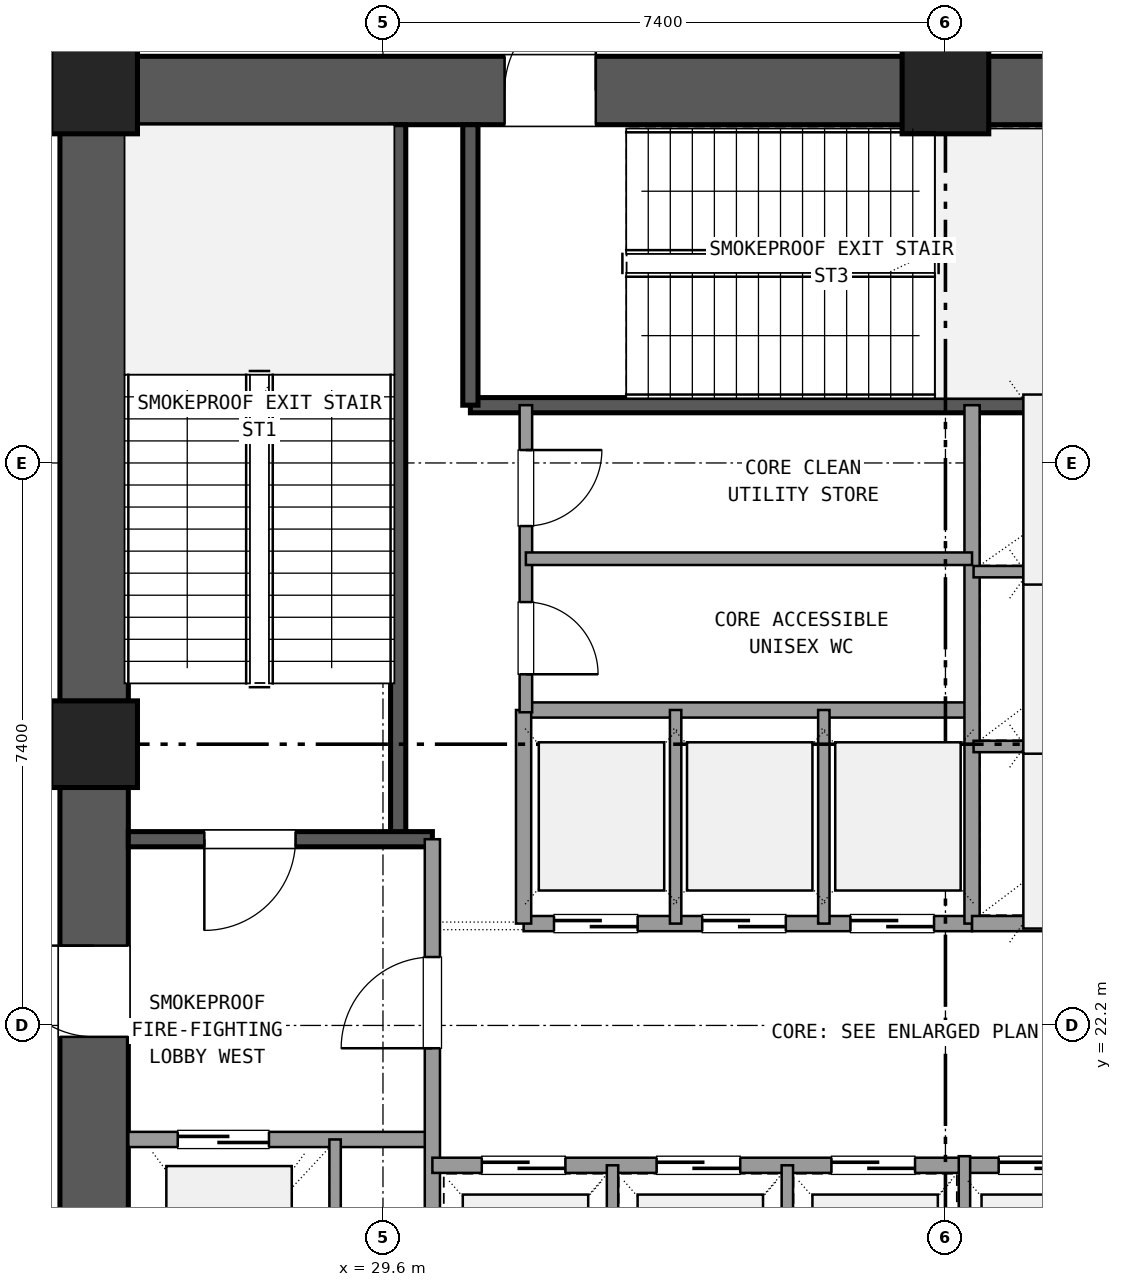
"""IFC4 building model, lengths in metres.
Left out: names, types, materials, properties, quantities, classifications, styles, units other than length and angle.
Written with IfcOpenShell. Run it as: python <this file> out.ifc"""

import sys

from ifc_helpers import new_model, si_unit, direction, frame, frame_2d, origin, origin_2d, place, context, subcontext, project, spatial, rectangle, extrude, element, fill, save


model = new_model("IFC4")
c1 = context("Model", 3, precision=1e-05, world=origin(), true_north=direction((0.0, 1.0)))
c2 = subcontext(c1, "Body", "Model", "MODEL_VIEW")
j1 = project(units=[si_unit("LENGTHUNIT", "METRE"), si_unit("PLANEANGLEUNIT", "RADIAN")], contexts=[c1])
p1 = place(None, origin())
s1 = spatial("IfcSite", under=j1, at=p1, CompositionType="ELEMENT")
p2 = place(p1, origin())
s2 = spatial("IfcBuilding", under=s1, at=p2, CompositionType="ELEMENT")
p3 = place(p2, origin())
s3 = spatial("IfcBuildingStorey", under=s2, at=p3, CompositionType="ELEMENT", Elevation=0.0)
for number, where, z_axis, x_axis in (
    (1, (37.0, 34.5, 0.0), (0.0, 0.0, 1.0), (1.0, 0.0, 0.0)),
    (2, (25.8, 34.5, 0.0), (0.0, 0.0, 1.0), (1.0, 0.0, 0.0)),
    (3, (25.8, 25.9, 0.0), (0.0, 0.0, 1.0), (1.0, 0.0, 0.0)),
):
    element("IfcColumn", number, at=place(p3, frame(where, z_axis=z_axis, x_axis=x_axis)), inside=s3, PredefinedType="COLUMN", context=c2, shape_type="SweptSolid", body=[
        extrude(rectangle(XDim=1.14, YDim=1.14, at=origin_2d()), origin(), (0.0, 0.0, 1.0), 5.4),
    ])
p4 = place(p3, frame((47.635, 34.5, 0.0), z_axis=(0.0, 0.0, 1.0), x_axis=(-1.0, 0.0, 0.0)))
e4 = element("IfcWall", 4, at=p4, inside=s3, PredefinedType="SHEAR", context=c2, shape_type="SweptSolid", body=[
    extrude(rectangle(XDim=10.07, YDim=0.9, at=frame_2d((5.035, 0.0))), origin(), (0.0, 0.0, 1.0), 5.1),
])
p5 = place(p4, frame((4.535, 0.0, 0.0)))
e5 = element("IfcOpeningElement", 5, at=p5, cuts=e4, PredefinedType="OPENING", context=c2, shape_type="SweptSolid", body=[
    extrude(rectangle(XDim=1.6, YDim=2.2, at=frame_2d((0.8, 1.1))), frame((0.0, 0.46, 0.0), z_axis=(0.0, -1.0, 0.0), x_axis=(1.0, 0.0, 0.0)), (0.0, 0.0, 1.0), 0.92),
])
p6 = place(p3, frame((36.435, 34.5, 0.0), z_axis=(0.0, 0.0, 1.0), x_axis=(-1.0, 0.0, 0.0)))
e6 = element("IfcWall", 6, at=p6, inside=s3, PredefinedType="SHEAR", context=c2, shape_type="SweptSolid", body=[
    extrude(rectangle(XDim=10.07, YDim=0.9, at=frame_2d((5.035, 0.0))), origin(), (0.0, 0.0, 1.0), 5.1),
])
p7 = place(p6, frame((4.035, 0.0, 0.0)))
e7 = element("IfcOpeningElement", 7, at=p7, cuts=e6, PredefinedType="OPENING", context=c2, shape_type="SweptSolid", body=[
    extrude(rectangle(XDim=1.2, YDim=2.15, at=frame_2d((0.6, 1.075))), frame((0.0, 0.46, 0.0), z_axis=(0.0, -1.0, 0.0), x_axis=(1.0, 0.0, 0.0)), (0.0, 0.0, 1.0), 0.92),
])
p8 = place(p3, frame((25.8, 33.935, 0.0), z_axis=(0.0, 0.0, 1.0), x_axis=(0.0, -1.0, 0.0)))
e8 = element("IfcWall", 8, at=p8, inside=s3, PredefinedType="SHEAR", context=c2, shape_type="SweptSolid", body=[
    extrude(rectangle(XDim=7.47, YDim=0.9, at=frame_2d((3.735, 0.0))), origin(), (0.0, 0.0, 1.0), 5.1),
])
p9 = place(p3, frame((25.8, 25.335, 0.0), z_axis=(0.0, 0.0, 1.0), x_axis=(0.0, -1.0, 0.0)))
e9 = element("IfcWall", 9, at=p9, inside=s3, PredefinedType="SHEAR", context=c2, shape_type="SweptSolid", body=[
    extrude(rectangle(XDim=7.47, YDim=0.9, at=frame_2d((3.735, 0.0))), origin(), (0.0, 0.0, 1.0), 5.1),
])
p10 = place(p9, frame((2.085, 0.0, 0.0)))
e10 = element("IfcOpeningElement", 10, at=p10, cuts=e9, PredefinedType="OPENING", context=c2, shape_type="SweptSolid", body=[
    extrude(rectangle(XDim=1.2, YDim=2.15, at=frame_2d((0.6, 1.075))), frame((0.0, 0.46, 0.0), z_axis=(0.0, -1.0, 0.0), x_axis=(1.0, 0.0, 0.0)), (0.0, 0.0, 1.0), 0.92),
])
p11 = place(p3, frame((29.8, 24.65, 0.0), z_axis=(0.0, 0.0, 1.0), x_axis=(0.0, 1.0, 0.0)))
e11 = element("IfcWall", 11, at=p11, inside=s3, PredefinedType="SHEAR", context=c2, shape_type="SweptSolid", body=[
    extrude(rectangle(XDim=9.4, YDim=0.2, at=frame_2d((4.7, 0.0))), origin(), (0.0, 0.0, 1.0), 5.1),
])
p12 = place(p3, frame((26.25, 24.65, 0.0), z_axis=(0.0, 0.0, 1.0), x_axis=(1.0, 0.0, 0.0)))
e12 = element("IfcWall", 12, at=p12, inside=s3, PredefinedType="SHEAR", context=c2, shape_type="SweptSolid", body=[
    extrude(rectangle(XDim=4.0, YDim=0.2, at=frame_2d((2.0, 0.0))), origin(), (0.0, 0.0, 1.0), 5.1),
])
p13 = place(p12, frame((1.0, 0.0, 0.0)))
e13 = element("IfcOpeningElement", 13, at=p13, cuts=e12, PredefinedType="OPENING", context=c2, shape_type="SweptSolid", body=[
    extrude(rectangle(XDim=1.2, YDim=2.15, at=frame_2d((0.6, 1.075))), frame((0.0, 0.11, 0.0), z_axis=(0.0, -1.0, 0.0), x_axis=(1.0, 0.0, 0.0)), (0.0, 0.0, 1.0), 0.22),
])
p14 = place(p3, frame((30.75, 30.36, 0.0), z_axis=(0.0, 0.0, 1.0), x_axis=(1.0, 0.0, 0.0)))
e14 = element("IfcWall", 14, at=p14, inside=s3, PredefinedType="SHEAR", context=c2, shape_type="SweptSolid", body=[
    extrude(rectangle(XDim=9.5, YDim=0.2, at=frame_2d((4.75, 0.0))), origin(), (0.0, 0.0, 1.0), 5.1),
])
p15 = place(p3, frame((30.75, 30.36, 0.0), z_axis=(0.0, 0.0, 1.0), x_axis=(0.0, 1.0, 0.0)))
e15 = element("IfcWall", 15, at=p15, inside=s3, PredefinedType="SHEAR", context=c2, shape_type="SweptSolid", body=[
    extrude(rectangle(XDim=3.69, YDim=0.2, at=frame_2d((1.845, 0.0))), origin(), (0.0, 0.0, 1.0), 5.1),
])
p16 = place(p3, frame((26.25, 20.7, 0.0), z_axis=(0.0, 0.0, 1.0), x_axis=(1.0, 0.0, 0.0)))
e16 = element("IfcWall", 16, at=p16, inside=s3, PredefinedType="SOLIDWALL", context=c2, shape_type="SweptSolid", body=[
    extrude(rectangle(XDim=4.0, YDim=0.2, at=frame_2d((2.0, 0.0))), origin(), (0.0, 0.0, 1.0), 4.11),
])
p17 = place(p16, frame((0.65, 0.0, 0.0)))
e17 = element("IfcOpeningElement", 17, at=p17, cuts=e16, PredefinedType="OPENING", context=c2, shape_type="SweptSolid", body=[
    extrude(rectangle(XDim=1.2, YDim=2.15, at=frame_2d((0.6, 1.075))), frame((0.0, 0.11, 0.0), z_axis=(0.0, -1.0, 0.0), x_axis=(1.0, 0.0, 0.0)), (0.0, 0.0, 1.0), 0.22),
])
p18 = place(p3, frame((30.25, 17.75, 0.0), z_axis=(0.0, 0.0, 1.0), x_axis=(0.0, 1.0, 0.0)))
e18 = element("IfcWall", 18, at=p18, inside=s3, PredefinedType="SOLIDWALL", context=c2, shape_type="SweptSolid", body=[
    extrude(rectangle(XDim=6.9, YDim=0.2, at=frame_2d((3.45, 0.0))), origin(), (0.0, 0.0, 1.0), 4.11),
])
p19 = place(p18, frame((4.15, 0.0, 0.0)))
e19 = element("IfcOpeningElement", 19, at=p19, cuts=e18, PredefinedType="OPENING", context=c2, shape_type="SweptSolid", body=[
    extrude(rectangle(XDim=1.2, YDim=2.15, at=frame_2d((0.6, 1.075))), frame((0.0, 0.11, 0.0), z_axis=(0.0, -1.0, 0.0), x_axis=(1.0, 0.0, 0.0)), (0.0, 0.0, 1.0), 0.22),
])
p20 = place(p3, frame((28.97, 17.75, 0.0), z_axis=(0.0, 0.0, 1.0), x_axis=(0.0, 1.0, 0.0)))
e20 = element("IfcWall", 20, at=p20, inside=s3, PredefinedType="PARTITIONING", context=c2, shape_type="SweptSolid", body=[
    extrude(rectangle(XDim=2.95, YDim=0.15, at=frame_2d((1.475, 0.0))), origin(), (0.0, 0.0, 1.0), 4.11),
])
p21 = place(p3, frame((30.25, 20.36, 0.0), z_axis=(0.0, 0.0, 1.0), x_axis=(1.0, 0.0, 0.0)))
e21 = element("IfcWall", 21, at=p21, inside=s3, PredefinedType="SOLIDWALL", context=c2, shape_type="SweptSolid", body=[
    extrude(rectangle(XDim=7.0, YDim=0.2, at=frame_2d((3.5, 0.0))), origin(), (0.0, 0.0, 1.0), 4.11),
])
p22 = place(p21, frame((0.65, 0.0, 0.0)))
e22 = element("IfcOpeningElement", 22, at=p22, cuts=e21, PredefinedType="OPENING", context=c2, shape_type="SweptSolid", body=[
    extrude(rectangle(XDim=1.1, YDim=2.15, at=frame_2d((0.55, 1.075))), frame((0.0, 0.11, 0.0), z_axis=(0.0, -1.0, 0.0), x_axis=(1.0, 0.0, 0.0)), (0.0, 0.0, 1.0), 0.22),
])
p23 = place(p21, frame((2.95, 0.0, 0.0)))
e23 = element("IfcOpeningElement", 23, at=p23, cuts=e21, PredefinedType="OPENING", context=c2, shape_type="SweptSolid", body=[
    extrude(rectangle(XDim=1.1, YDim=2.15, at=frame_2d((0.55, 1.075))), frame((0.0, 0.11, 0.0), z_axis=(0.0, -1.0, 0.0), x_axis=(1.0, 0.0, 0.0)), (0.0, 0.0, 1.0), 0.22),
])
p24 = place(p21, frame((5.25, 0.0, 0.0)))
e24 = element("IfcOpeningElement", 24, at=p24, cuts=e21, PredefinedType="OPENING", context=c2, shape_type="SweptSolid", body=[
    extrude(rectangle(XDim=1.1, YDim=2.15, at=frame_2d((0.55, 1.075))), frame((0.0, 0.11, 0.0), z_axis=(0.0, -1.0, 0.0), x_axis=(1.0, 0.0, 0.0)), (0.0, 0.0, 1.0), 0.22),
])
for number, where, z_axis, x_axis in (
    (25, (32.62, 17.75, 0.0), (0.0, 0.0, 1.0), (0.0, 1.0, 0.0)),
    (26, (34.92, 17.75, 0.0), (0.0, 0.0, 1.0), (0.0, 1.0, 0.0)),
):
    element("IfcWall", number, at=place(p3, frame(where, z_axis=z_axis, x_axis=x_axis)), inside=s3, PredefinedType="PARTITIONING", context=c2, shape_type="SweptSolid", body=[
        extrude(rectangle(XDim=2.61, YDim=0.15, at=frame_2d((1.305, 0.0))), origin(), (0.0, 0.0, 1.0), 4.11),
    ])
p25 = place(p3, frame((37.25, 20.36, 0.0), z_axis=(0.0, 0.0, 1.0), x_axis=(1.0, 0.0, 0.0)))
e27 = element("IfcWall", 27, at=p25, inside=s3, PredefinedType="SOLIDWALL", context=c2, shape_type="SweptSolid", body=[
    extrude(rectangle(XDim=6.1, YDim=0.2, at=frame_2d((3.05, 0.0))), origin(), (0.0, 0.0, 1.0), 4.11),
])
p26 = place(p25, frame((0.45, 0.0, 0.0)))
e28 = element("IfcOpeningElement", 28, at=p26, cuts=e27, PredefinedType="OPENING", context=c2, shape_type="SweptSolid", body=[
    extrude(rectangle(XDim=1.1, YDim=2.15, at=frame_2d((0.55, 1.075))), frame((0.0, 0.11, 0.0), z_axis=(0.0, -1.0, 0.0), x_axis=(1.0, 0.0, 0.0)), (0.0, 0.0, 1.0), 0.22),
])
p27 = place(p25, frame((2.5, 0.0, 0.0)))
e29 = element("IfcOpeningElement", 29, at=p27, cuts=e27, PredefinedType="OPENING", context=c2, shape_type="SweptSolid", body=[
    extrude(rectangle(XDim=1.1, YDim=2.15, at=frame_2d((0.55, 1.075))), frame((0.0, 0.11, 0.0), z_axis=(0.0, -1.0, 0.0), x_axis=(1.0, 0.0, 0.0)), (0.0, 0.0, 1.0), 0.22),
])
p28 = place(p25, frame((4.55, 0.0, 0.0)))
e30 = element("IfcOpeningElement", 30, at=p28, cuts=e27, PredefinedType="OPENING", context=c2, shape_type="SweptSolid", body=[
    extrude(rectangle(XDim=1.1, YDim=2.15, at=frame_2d((0.55, 1.075))), frame((0.0, 0.11, 0.0), z_axis=(0.0, -1.0, 0.0), x_axis=(1.0, 0.0, 0.0)), (0.0, 0.0, 1.0), 0.22),
])
p29 = place(p3, frame((37.25, 17.75, 0.0), z_axis=(0.0, 0.0, 1.0), x_axis=(0.0, 1.0, 0.0)))
e31 = element("IfcWall", 31, at=p29, inside=s3, PredefinedType="PARTITIONING", context=c2, shape_type="SweptSolid", body=[
    extrude(rectangle(XDim=2.73, YDim=0.15, at=frame_2d((1.365, 0.0))), origin(), (0.0, 0.0, 1.0), 4.11),
])
p30 = place(p3, frame((31.45, 23.54, 0.0), z_axis=(0.0, 0.0, 1.0), x_axis=(1.0, 0.0, 0.0)))
e32 = element("IfcWall", 32, at=p30, inside=s3, PredefinedType="SOLIDWALL", context=c2, shape_type="SweptSolid", body=[
    extrude(rectangle(XDim=5.9, YDim=0.2, at=frame_2d((2.95, 0.0))), origin(), (0.0, 0.0, 1.0), 4.11),
])
p31 = place(p30, frame((0.4, 0.0, 0.0)))
e33 = element("IfcOpeningElement", 33, at=p31, cuts=e32, PredefinedType="OPENING", context=c2, shape_type="SweptSolid", body=[
    extrude(rectangle(XDim=1.1, YDim=2.15, at=frame_2d((0.55, 1.075))), frame((0.0, 0.11, 0.0), z_axis=(0.0, -1.0, 0.0), x_axis=(1.0, 0.0, 0.0)), (0.0, 0.0, 1.0), 0.22),
])
p32 = place(p30, frame((2.35, 0.0, 0.0)))
e34 = element("IfcOpeningElement", 34, at=p32, cuts=e32, PredefinedType="OPENING", context=c2, shape_type="SweptSolid", body=[
    extrude(rectangle(XDim=1.1, YDim=2.15, at=frame_2d((0.55, 1.075))), frame((0.0, 0.11, 0.0), z_axis=(0.0, -1.0, 0.0), x_axis=(1.0, 0.0, 0.0)), (0.0, 0.0, 1.0), 0.22),
])
p33 = place(p30, frame((4.3, 0.0, 0.0)))
e35 = element("IfcOpeningElement", 35, at=p33, cuts=e32, PredefinedType="OPENING", context=c2, shape_type="SweptSolid", body=[
    extrude(rectangle(XDim=1.1, YDim=2.15, at=frame_2d((0.55, 1.075))), frame((0.0, 0.11, 0.0), z_axis=(0.0, -1.0, 0.0), x_axis=(1.0, 0.0, 0.0)), (0.0, 0.0, 1.0), 0.22),
])
p34 = place(p3, frame((31.45, 26.35, 0.0), z_axis=(0.0, 0.0, 1.0), x_axis=(1.0, 0.0, 0.0)))
e36 = element("IfcWall", 36, at=p34, inside=s3, PredefinedType="SOLIDWALL", context=c2, shape_type="SweptSolid", body=[
    extrude(rectangle(XDim=5.9, YDim=0.2, at=frame_2d((2.95, 0.0))), origin(), (0.0, 0.0, 1.0), 4.11),
])
p35 = place(p3, frame((31.45, 23.54, 0.0), z_axis=(0.0, 0.0, 1.0), x_axis=(0.0, 1.0, 0.0)))
e37 = element("IfcWall", 37, at=p35, inside=s3, PredefinedType="SOLIDWALL", context=c2, shape_type="SweptSolid", body=[
    extrude(rectangle(XDim=2.81, YDim=0.2, at=frame_2d((1.405, 0.0))), origin(), (0.0, 0.0, 1.0), 4.11),
])
for number, where, z_axis, x_axis in (
    (38, (33.45, 23.54, 0.0), (0.0, 0.0, 1.0), (0.0, 1.0, 0.0)),
    (39, (35.4, 23.54, 0.0), (0.0, 0.0, 1.0), (0.0, 1.0, 0.0)),
):
    element("IfcWall", number, at=place(p3, frame(where, z_axis=z_axis, x_axis=x_axis)), inside=s3, PredefinedType="PARTITIONING", context=c2, shape_type="SweptSolid", body=[
        extrude(rectangle(XDim=2.81, YDim=0.15, at=frame_2d((1.405, 0.0))), origin(), (0.0, 0.0, 1.0), 4.11),
    ])
p36 = place(p3, frame((37.35, 23.54, 0.0), z_axis=(0.0, 0.0, 1.0), x_axis=(0.0, 1.0, 0.0)))
e40 = element("IfcWall", 40, at=p36, inside=s3, PredefinedType="SOLIDWALL", context=c2, shape_type="SweptSolid", body=[
    extrude(rectangle(XDim=6.82, YDim=0.2, at=frame_2d((3.41, 0.0))), origin(), (0.0, 0.0, 1.0), 4.11),
])
p37 = place(p3, frame((37.35, 23.54, 0.0), z_axis=(0.0, 0.0, 1.0), x_axis=(1.0, 0.0, 0.0)))
e41 = element("IfcWall", 41, at=p37, inside=s3, PredefinedType="SOLIDWALL", context=c2, shape_type="SweptSolid", body=[
    extrude(rectangle(XDim=3.05, YDim=0.2, at=frame_2d((1.525, 0.0))), origin(), (0.0, 0.0, 1.0), 4.11),
])
for number, where, z_axis, x_axis in (
    (42, (37.37, 25.87, 0.0), (0.0, 0.0, 1.0), (1.0, 0.0, 0.0)),
    (43, (37.37, 28.17, 0.0), (0.0, 0.0, 1.0), (1.0, 0.0, 0.0)),
):
    element("IfcWall", number, at=place(p3, frame(where, z_axis=z_axis, x_axis=x_axis)), inside=s3, PredefinedType="PARTITIONING", context=c2, shape_type="SweptSolid", body=[
        extrude(rectangle(XDim=3.01, YDim=0.15, at=frame_2d((1.505, 0.0))), origin(), (0.0, 0.0, 1.0), 4.11),
    ])
p38 = place(p3, frame((31.48, 26.32, 0.0), z_axis=(0.0, 0.0, 1.0), x_axis=(0.0, 1.0, 0.0)))
e44 = element("IfcWall", 44, at=p38, inside=s3, PredefinedType="PLUMBINGWALL", context=c2, shape_type="SweptSolid", body=[
    extrude(rectangle(XDim=4.04, YDim=0.165, at=frame_2d((2.02, 0.0))), origin(), (0.0, 0.0, 1.0), 4.11),
])
p39 = place(p38, frame((0.5, 0.0, 0.0)))
e45 = element("IfcOpeningElement", 45, at=p39, cuts=e44, PredefinedType="OPENING", context=c2, shape_type="SweptSolid", body=[
    extrude(rectangle(XDim=0.95, YDim=2.1, at=frame_2d((0.475, 1.05))), frame((0.0, 0.093, 0.0), z_axis=(0.0, -1.0, 0.0), x_axis=(1.0, 0.0, 0.0)), (0.0, 0.0, 1.0), 0.185),
])
p40 = place(p38, frame((2.45, 0.0, 0.0)))
e46 = element("IfcOpeningElement", 46, at=p40, cuts=e44, PredefinedType="OPENING", context=c2, shape_type="SweptSolid", body=[
    extrude(rectangle(XDim=1.0, YDim=2.15, at=frame_2d((0.5, 1.075))), frame((0.0, 0.093, 0.0), z_axis=(0.0, -1.0, 0.0), x_axis=(1.0, 0.0, 0.0)), (0.0, 0.0, 1.0), 0.185),
])
p41 = place(p3, frame((31.48, 28.34, 0.0), z_axis=(0.0, 0.0, 1.0), x_axis=(1.0, 0.0, 0.0)))
e47 = element("IfcWall", 47, at=p41, inside=s3, PredefinedType="PLUMBINGWALL", context=c2, shape_type="SweptSolid", body=[
    extrude(rectangle(XDim=5.87, YDim=0.165, at=frame_2d((2.935, 0.0))), origin(), (0.0, 0.0, 1.0), 4.11),
])
p42 = place(p13, frame((1.2, 0.0, 0.0), z_axis=(0.0, 0.0, 1.0), x_axis=(-1.0, 0.0, 0.0)))
e48 = element("IfcDoor", 48, at=p42, inside=s3, OperationType="SINGLE_SWING_LEFT", PredefinedType="DOOR", context=c2, shape_type="SweptSolid", body=[
    extrude(rectangle(XDim=1.2, YDim=2.15, at=frame_2d((0.6, 1.075))), frame((0.0, 0.025, 0.0), z_axis=(0.0, -1.0, 0.0), x_axis=(1.0, 0.0, 0.0)), (0.0, 0.0, 1.0), 0.05),
])
fill(e13, e48)
p43 = place(p17, origin())
e49 = element("IfcDoor", 49, at=p43, inside=s3, OperationType="SLIDING_TO_LEFT", PredefinedType="DOOR", context=c2, shape_type="SweptSolid", body=[
    extrude(rectangle(XDim=1.2, YDim=2.15, at=frame_2d((0.6, 1.075))), frame((0.0, 0.025, 0.0), z_axis=(0.0, -1.0, 0.0), x_axis=(1.0, 0.0, 0.0)), (0.0, 0.0, 1.0), 0.05),
])
fill(e17, e49)
p44 = place(p19, origin())
e50 = element("IfcDoor", 50, at=p44, inside=s3, OperationType="SINGLE_SWING_LEFT", PredefinedType="DOOR", context=c2, shape_type="SweptSolid", body=[
    extrude(rectangle(XDim=1.2, YDim=2.15, at=frame_2d((0.6, 1.075))), frame((0.0, 0.025, 0.0), z_axis=(0.0, -1.0, 0.0), x_axis=(1.0, 0.0, 0.0)), (0.0, 0.0, 1.0), 0.05),
])
fill(e19, e50)
p45 = place(p10, frame((1.2, 0.0, 0.0), z_axis=(0.0, 0.0, 1.0), x_axis=(-1.0, 0.0, 0.0)))
e51 = element("IfcDoor", 51, at=p45, inside=s3, OperationType="SINGLE_SWING_LEFT", PredefinedType="DOOR", context=c2, shape_type="SweptSolid", body=[
    extrude(rectangle(XDim=1.2, YDim=2.15, at=frame_2d((0.6, 1.075))), frame((0.0, 0.025, 0.0), z_axis=(0.0, -1.0, 0.0), x_axis=(1.0, 0.0, 0.0)), (0.0, 0.0, 1.0), 0.05),
])
fill(e10, e51)
p46 = place(p7, frame((1.2, 0.0, 0.0), z_axis=(0.0, 0.0, 1.0), x_axis=(-1.0, 0.0, 0.0)))
e52 = element("IfcDoor", 52, at=p46, inside=s3, OperationType="SINGLE_SWING_LEFT", PredefinedType="DOOR", context=c2, shape_type="SweptSolid", body=[
    extrude(rectangle(XDim=1.2, YDim=2.15, at=frame_2d((0.6, 1.075))), frame((0.0, 0.025, 0.0), z_axis=(0.0, -1.0, 0.0), x_axis=(1.0, 0.0, 0.0)), (0.0, 0.0, 1.0), 0.05),
])
fill(e7, e52)
p47 = place(p22, origin())
e53 = element("IfcDoor", 53, at=p47, inside=s3, OperationType="SLIDING_TO_LEFT", PredefinedType="DOOR", context=c2, shape_type="SweptSolid", body=[
    extrude(rectangle(XDim=1.1, YDim=2.15, at=frame_2d((0.55, 1.075))), frame((0.0, 0.025, 0.0), z_axis=(0.0, -1.0, 0.0), x_axis=(1.0, 0.0, 0.0)), (0.0, 0.0, 1.0), 0.05),
])
fill(e22, e53)
p48 = place(p23, origin())
e54 = element("IfcDoor", 54, at=p48, inside=s3, OperationType="SLIDING_TO_LEFT", PredefinedType="DOOR", context=c2, shape_type="SweptSolid", body=[
    extrude(rectangle(XDim=1.1, YDim=2.15, at=frame_2d((0.55, 1.075))), frame((0.0, 0.025, 0.0), z_axis=(0.0, -1.0, 0.0), x_axis=(1.0, 0.0, 0.0)), (0.0, 0.0, 1.0), 0.05),
])
fill(e23, e54)
p49 = place(p24, origin())
e55 = element("IfcDoor", 55, at=p49, inside=s3, OperationType="SLIDING_TO_LEFT", PredefinedType="DOOR", context=c2, shape_type="SweptSolid", body=[
    extrude(rectangle(XDim=1.1, YDim=2.15, at=frame_2d((0.55, 1.075))), frame((0.0, 0.025, 0.0), z_axis=(0.0, -1.0, 0.0), x_axis=(1.0, 0.0, 0.0)), (0.0, 0.0, 1.0), 0.05),
])
fill(e24, e55)
p50 = place(p26, origin())
e56 = element("IfcDoor", 56, at=p50, inside=s3, OperationType="SLIDING_TO_LEFT", PredefinedType="DOOR", context=c2, shape_type="SweptSolid", body=[
    extrude(rectangle(XDim=1.1, YDim=2.15, at=frame_2d((0.55, 1.075))), frame((0.0, 0.025, 0.0), z_axis=(0.0, -1.0, 0.0), x_axis=(1.0, 0.0, 0.0)), (0.0, 0.0, 1.0), 0.05),
])
fill(e28, e56)
p51 = place(p31, origin())
e57 = element("IfcDoor", 57, at=p51, inside=s3, OperationType="SLIDING_TO_RIGHT", PredefinedType="DOOR", context=c2, shape_type="SweptSolid", body=[
    extrude(rectangle(XDim=1.1, YDim=2.15, at=frame_2d((0.55, 1.075))), frame((0.0, 0.025, 0.0), z_axis=(0.0, -1.0, 0.0), x_axis=(1.0, 0.0, 0.0)), (0.0, 0.0, 1.0), 0.05),
])
fill(e33, e57)
p52 = place(p32, origin())
e58 = element("IfcDoor", 58, at=p52, inside=s3, OperationType="SLIDING_TO_RIGHT", PredefinedType="DOOR", context=c2, shape_type="SweptSolid", body=[
    extrude(rectangle(XDim=1.1, YDim=2.15, at=frame_2d((0.55, 1.075))), frame((0.0, 0.025, 0.0), z_axis=(0.0, -1.0, 0.0), x_axis=(1.0, 0.0, 0.0)), (0.0, 0.0, 1.0), 0.05),
])
fill(e34, e58)
p53 = place(p33, origin())
e59 = element("IfcDoor", 59, at=p53, inside=s3, OperationType="SLIDING_TO_RIGHT", PredefinedType="DOOR", context=c2, shape_type="SweptSolid", body=[
    extrude(rectangle(XDim=1.1, YDim=2.15, at=frame_2d((0.55, 1.075))), frame((0.0, 0.025, 0.0), z_axis=(0.0, -1.0, 0.0), x_axis=(1.0, 0.0, 0.0)), (0.0, 0.0, 1.0), 0.05),
])
fill(e35, e59)
p54 = place(p39, frame((0.95, 0.0, 0.0), z_axis=(0.0, 0.0, 1.0), x_axis=(-1.0, 0.0, 0.0)))
e60 = element("IfcDoor", 60, at=p54, inside=s3, OperationType="SINGLE_SWING_LEFT", PredefinedType="DOOR", context=c2, shape_type="SweptSolid", body=[
    extrude(rectangle(XDim=0.95, YDim=2.1, at=frame_2d((0.475, 1.05))), frame((0.0, 0.025, 0.0), z_axis=(0.0, -1.0, 0.0), x_axis=(1.0, 0.0, 0.0)), (0.0, 0.0, 1.0), 0.05),
])
fill(e45, e60)
p55 = place(p40, frame((1.0, 0.0, 0.0), z_axis=(0.0, 0.0, 1.0), x_axis=(-1.0, 0.0, 0.0)))
e61 = element("IfcDoor", 61, at=p55, inside=s3, OperationType="SINGLE_SWING_RIGHT", PredefinedType="DOOR", context=c2, shape_type="SweptSolid", body=[
    extrude(rectangle(XDim=1.0, YDim=2.15, at=frame_2d((0.5, 1.075))), frame((0.0, 0.025, 0.0), z_axis=(0.0, -1.0, 0.0), x_axis=(1.0, 0.0, 0.0)), (0.0, 0.0, 1.0), 0.05),
])
fill(e46, e61)
save(model, sys.argv[1])
